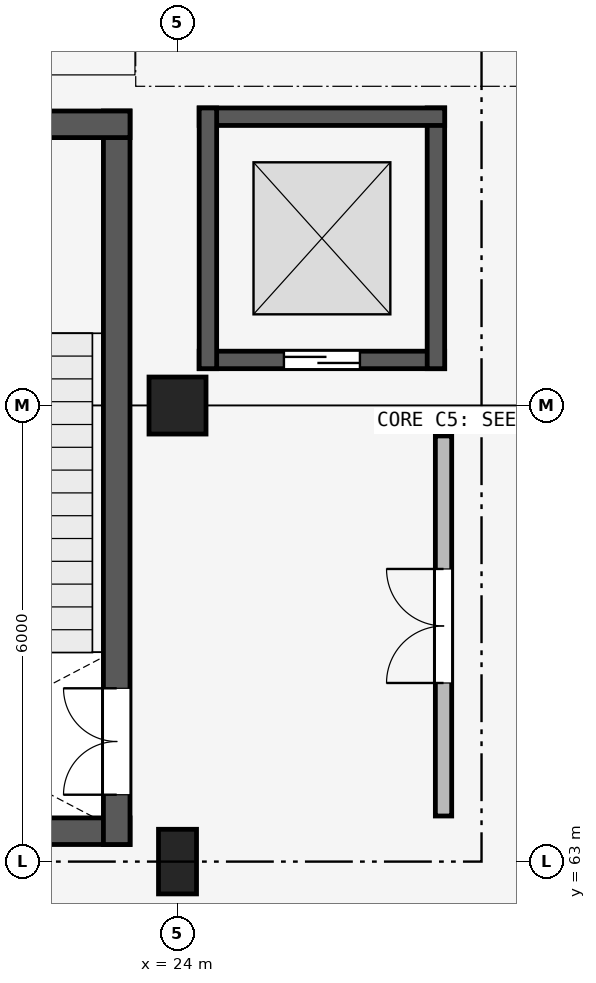
"""IFC4 building model, lengths in metres.
Left out: names, types, materials, properties, quantities, classifications, styles, units other than length and angle.
Written with IfcOpenShell. Run it as: python <this file> out.ifc"""

import sys

from ifc_helpers import new_model, si_unit, direction, frame, frame_2d, origin, origin_2d, place, context, subcontext, project, spatial, rectangle, extrude, element, fill, save


model = new_model("IFC4")
c1 = context("Model", 3, precision=1e-05, world=origin(), true_north=direction((0.0, 1.0)))
c2 = subcontext(c1, "Body", "Model", "MODEL_VIEW")
j1 = project(units=[si_unit("LENGTHUNIT", "METRE"), si_unit("PLANEANGLEUNIT", "RADIAN")], contexts=[c1])
p1 = place(None, origin())
s1 = spatial("IfcSite", under=j1, at=p1, CompositionType="ELEMENT")
p2 = place(p1, origin())
s2 = spatial("IfcBuilding", under=s1, at=p2, CompositionType="ELEMENT")
p3 = place(p2, frame((0.0, 0.0, -4.5)))
s3 = spatial("IfcBuildingStorey", under=s2, at=p3, CompositionType="ELEMENT", Elevation=-4.5)
p4 = place(p3, frame((24.0, 63.0, 0.0), z_axis=(0.0, 0.0, 1.0), x_axis=(1.0, 0.0, 0.0)))
e1 = element("IfcColumn", 1, at=p4, inside=s3, PredefinedType="COLUMN", context=c2, shape_type="SweptSolid", body=[
    extrude(rectangle(XDim=0.5, YDim=0.85, at=origin_2d()), origin(), (0.0, 0.0, 1.0), 4.5),
])
p5 = place(p3, frame((24.0, 69.0, 0.0), z_axis=(0.0, 0.0, 1.0), x_axis=(1.0, 0.0, 0.0)))
e2 = element("IfcColumn", 2, at=p5, inside=s3, PredefinedType="COLUMN", context=c2, shape_type="SweptSolid", body=[
    extrude(rectangle(XDim=0.75, YDim=0.75, at=origin_2d()), origin(), (0.0, 0.0, 1.0), 4.5),
])
p6 = place(p3, frame((18.525, 63.4, 0.0), z_axis=(0.0, 0.0, 1.0), x_axis=(1.0, 0.0, 0.0)))
e3 = element("IfcWall", 3, at=p6, inside=s3, PredefinedType="SHEAR", context=c2, shape_type="SweptSolid", body=[
    extrude(rectangle(XDim=4.85, YDim=0.35, at=frame_2d((2.425, 0.0))), origin(), (0.0, 0.0, 1.0), 4.36),
])
p7 = place(p3, frame((23.2, 63.225, 0.0), z_axis=(0.0, 0.0, 1.0), x_axis=(0.0, 1.0, 0.0)))
e4 = element("IfcWall", 4, at=p7, inside=s3, PredefinedType="SHEAR", context=c2, shape_type="SweptSolid", body=[
    extrude(rectangle(XDim=9.65, YDim=0.35, at=frame_2d((4.825, 0.0))), origin(), (0.0, 0.0, 1.0), 4.36),
])
p8 = place(p7, frame((0.655, 0.0, 0.0)))
e5 = element("IfcOpeningElement", 5, at=p8, cuts=e4, PredefinedType="OPENING", context=c2, shape_type="SweptSolid", body=[
    extrude(rectangle(XDim=1.4, YDim=2.2, at=frame_2d((0.7, 1.1))), frame((0.0, 0.185, 0.0), z_axis=(0.0, -1.0, 0.0), x_axis=(1.0, 0.0, 0.0)), (0.0, 0.0, 1.0), 0.37),
])
p9 = place(p3, frame((23.375, 72.7, 0.0), z_axis=(0.0, 0.0, 1.0), x_axis=(-1.0, 0.0, 0.0)))
e6 = element("IfcWall", 6, at=p9, inside=s3, PredefinedType="SHEAR", context=c2, shape_type="SweptSolid", body=[
    extrude(rectangle(XDim=4.85, YDim=0.35, at=frame_2d((2.425, 0.0))), origin(), (0.0, 0.0, 1.0), 4.36),
])
p10 = place(p3, frame((27.5, 63.6, 0.0), z_axis=(0.0, 0.0, 1.0), x_axis=(0.0, 1.0, 0.0)))
e7 = element("IfcWall", 7, at=p10, inside=s3, PredefinedType="PARTITIONING", context=c2, shape_type="SweptSolid", body=[
    extrude(rectangle(XDim=5.0, YDim=0.215, at=frame_2d((2.5, 0.0))), origin(), (0.0, 0.0, 1.0), 4.19),
])
p11 = place(p10, frame((1.75, 0.0, 0.0)))
e8 = element("IfcOpeningElement", 8, at=p11, cuts=e7, PredefinedType="OPENING", context=c2, shape_type="SweptSolid", body=[
    extrude(rectangle(XDim=1.5, YDim=2.15, at=frame_2d((0.75, 1.075))), frame((0.0, 0.117, 0.0), z_axis=(0.0, -1.0, 0.0), x_axis=(1.0, 0.0, 0.0)), (0.0, 0.0, 1.0), 0.235),
])
p12 = place(p3, frame((24.285, 69.6, 0.0), z_axis=(0.0, 0.0, 1.0), x_axis=(1.0, 0.0, 0.0)))
e9 = element("IfcWall", 9, at=p12, inside=s3, PredefinedType="SHEAR", context=c2, shape_type="SweptSolid", body=[
    extrude(rectangle(XDim=3.23, YDim=0.23, at=frame_2d((1.615, 0.0))), origin(), (0.0, 0.0, 1.0), 4.5),
])
p13 = place(p12, frame((1.115, 0.0, 0.0)))
e10 = element("IfcOpeningElement", 10, at=p13, cuts=e9, PredefinedType="OPENING", context=c2, shape_type="SweptSolid", body=[
    extrude(rectangle(XDim=1.0, YDim=2.15, at=frame_2d((0.5, 1.075))), frame((0.0, 0.125, 0.0), z_axis=(0.0, -1.0, 0.0), x_axis=(1.0, 0.0, 0.0)), (0.0, 0.0, 1.0), 0.25),
])
p14 = place(p3, frame((27.4, 69.485, 0.0), z_axis=(0.0, 0.0, 1.0), x_axis=(0.0, 1.0, 0.0)))
e11 = element("IfcWall", 11, at=p14, inside=s3, PredefinedType="SHEAR", context=c2, shape_type="SweptSolid", body=[
    extrude(rectangle(XDim=3.43, YDim=0.23, at=frame_2d((1.715, 0.0))), origin(), (0.0, 0.0, 1.0), 4.5),
])
p15 = place(p3, frame((27.515, 72.8, 0.0), z_axis=(0.0, 0.0, 1.0), x_axis=(-1.0, 0.0, 0.0)))
e12 = element("IfcWall", 12, at=p15, inside=s3, PredefinedType="SHEAR", context=c2, shape_type="SweptSolid", body=[
    extrude(rectangle(XDim=3.23, YDim=0.23, at=frame_2d((1.615, 0.0))), origin(), (0.0, 0.0, 1.0), 4.5),
])
p16 = place(p3, frame((24.4, 72.915, 0.0), z_axis=(0.0, 0.0, 1.0), x_axis=(0.0, -1.0, 0.0)))
e13 = element("IfcWall", 13, at=p16, inside=s3, PredefinedType="SHEAR", context=c2, shape_type="SweptSolid", body=[
    extrude(rectangle(XDim=3.43, YDim=0.23, at=frame_2d((1.715, 0.0))), origin(), (0.0, 0.0, 1.0), 4.5),
])
p17 = place(p8, origin())
e14 = element("IfcDoor", 14, at=p17, inside=s3, OperationType="DOUBLE_DOOR_SINGLE_SWING", PredefinedType="DOOR", context=c2, shape_type="SweptSolid", body=[
    extrude(rectangle(XDim=1.4, YDim=2.2, at=frame_2d((0.7, 1.1))), frame((0.0, 0.025, 0.0), z_axis=(0.0, -1.0, 0.0), x_axis=(1.0, 0.0, 0.0)), (0.0, 0.0, 1.0), 0.05),
])
fill(e5, e14)
p18 = place(p11, origin())
e15 = element("IfcDoor", 15, at=p18, inside=s3, OperationType="DOUBLE_DOOR_SINGLE_SWING", PredefinedType="DOOR", context=c2, shape_type="SweptSolid", body=[
    extrude(rectangle(XDim=1.5, YDim=2.15, at=frame_2d((0.75, 1.075))), frame((0.0, 0.025, 0.0), z_axis=(0.0, -1.0, 0.0), x_axis=(1.0, 0.0, 0.0)), (0.0, 0.0, 1.0), 0.05),
])
fill(e8, e15)
p19 = place(p13, origin())
e16 = element("IfcDoor", 16, at=p19, inside=s3, OperationType="SLIDING_TO_LEFT", PredefinedType="DOOR", context=c2, shape_type="SweptSolid", body=[
    extrude(rectangle(XDim=1.0, YDim=2.15, at=frame_2d((0.5, 1.075))), frame((0.0, 0.025, 0.0), z_axis=(0.0, -1.0, 0.0), x_axis=(1.0, 0.0, 0.0)), (0.0, 0.0, 1.0), 0.05),
])
fill(e10, e16)
save(model, sys.argv[1])
